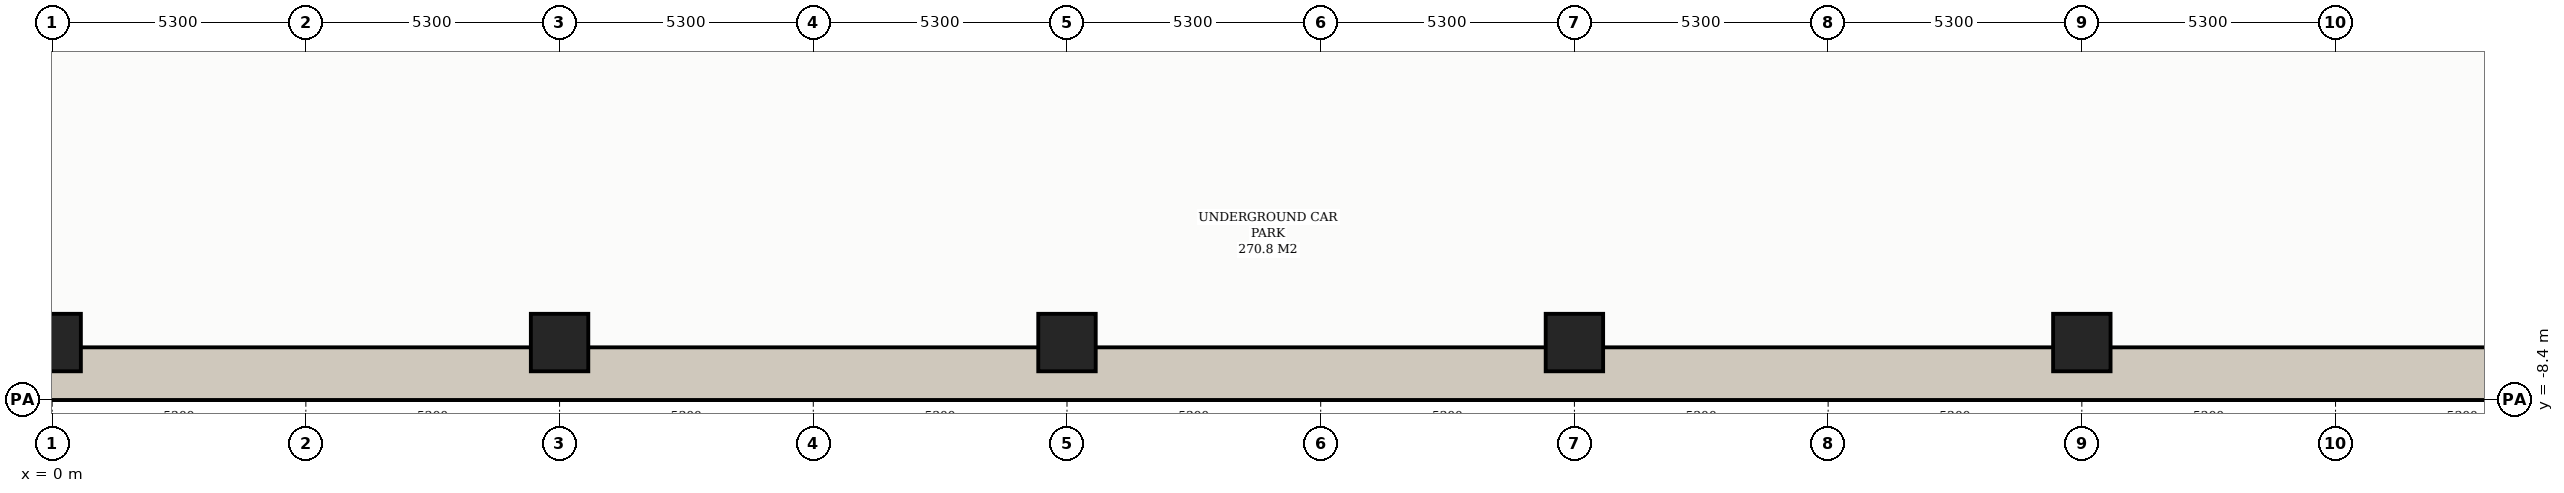
"""IFC4 building model, lengths in metres.
Left out: names, types, materials, properties, quantities, classifications, styles, units other than length and angle.
Written with IfcOpenShell. Run it as: python <this file> out.ifc"""

import sys

from ifc_helpers import new_model, si_unit, direction, frame, frame_2d, origin, origin_2d, place, context, subcontext, project, spatial, rectangle, hollow_rectangle, extrude, element, save


model = new_model("IFC4")
c1 = context("Model", 3, precision=1e-05, world=origin(), true_north=direction((0.0, 1.0)))
c2 = subcontext(c1, "Body", "Model", "MODEL_VIEW")
j1 = project(units=[si_unit("LENGTHUNIT", "METRE"), si_unit("PLANEANGLEUNIT", "RADIAN")], contexts=[c1])
p1 = place(None, origin())
s1 = spatial("IfcSite", under=j1, at=p1, CompositionType="ELEMENT")
p2 = place(p1, origin())
s2 = spatial("IfcBuilding", under=s1, at=p2, CompositionType="ELEMENT")
p3 = place(p2, frame((0.0, 0.0, -8.4)))
s3 = spatial("IfcBuildingStorey", under=s2, at=p3, CompositionType="ELEMENT", Elevation=-8.4)
p4 = place(p3, frame((-10.6, -7.85, 0.0), z_axis=(0.0, 0.0, 1.0), x_axis=(1.0, 0.0, 0.0)))
e1 = element("IfcWall", 1, at=p4, inside=s3, PredefinedType="USERDEFINED", context=c2, shape_type="SweptSolid", body=[
    extrude(rectangle(XDim=74.2, YDim=1.1, at=frame_2d((37.1, 0.0))), origin(), (0.0, 0.0, 1.0), 3.92),
])
for number, where, z_axis, x_axis in (
    (2, (0.0, -7.2, 0.0), (0.0, 0.0, 1.0), (1.0, 0.0, 0.0)),
    (3, (10.6, -7.2, 0.0), (0.0, 0.0, 1.0), (1.0, 0.0, 0.0)),
    (4, (21.2, -7.2, 0.0), (0.0, 0.0, 1.0), (1.0, 0.0, 0.0)),
    (5, (31.8, -7.2, 0.0), (0.0, 0.0, 1.0), (1.0, 0.0, 0.0)),
    (6, (42.4, -7.2, 0.0), (0.0, 0.0, 1.0), (1.0, 0.0, 0.0)),
):
    element("IfcColumn", number, at=place(p3, frame(where, z_axis=z_axis, x_axis=x_axis)), inside=s3, PredefinedType="COLUMN", context=c2, shape_type="SweptSolid", body=[
        extrude(hollow_rectangle(XDim=1.2, YDim=1.2, WallThickness=0.04, at=origin_2d()), origin(), (0.0, 0.0, 1.0), 4.2),
    ])
save(model, sys.argv[1])
